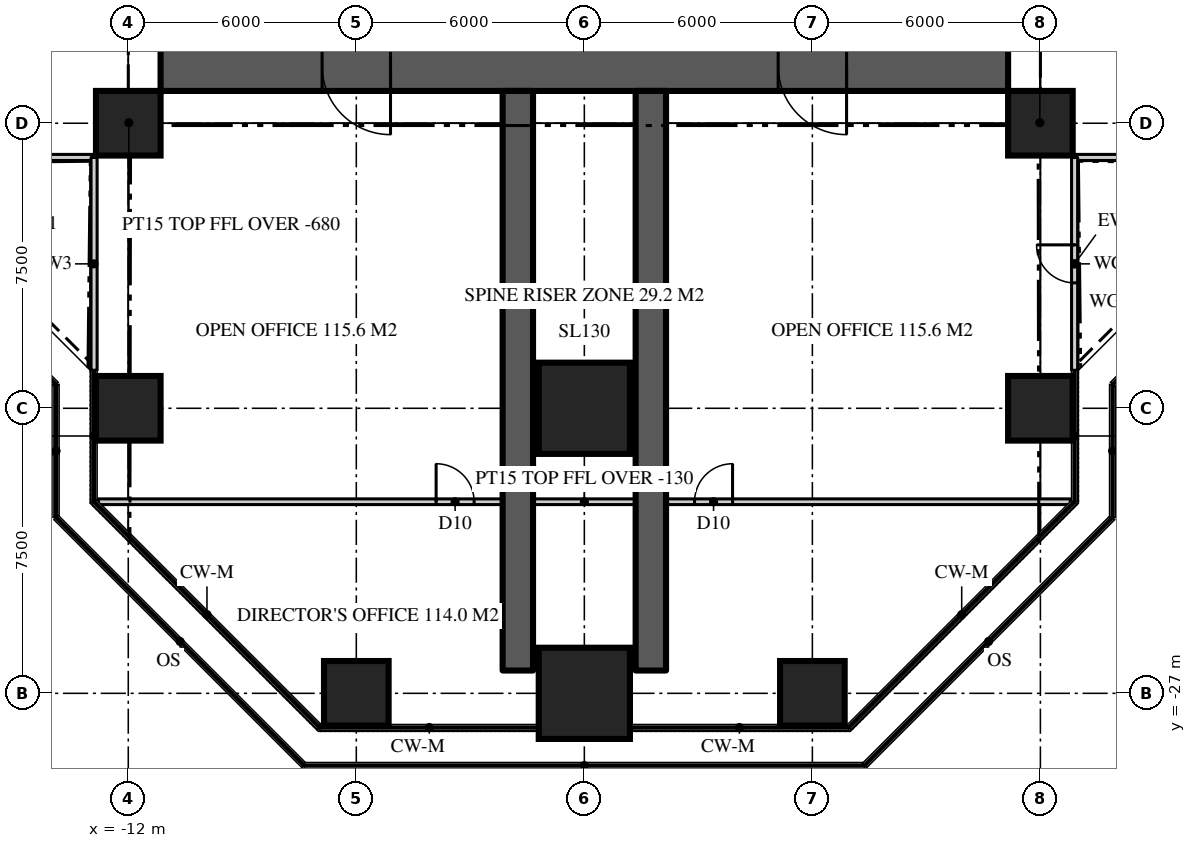
"""IFC4 building model, lengths in metres.
Left out: names, types, materials, properties, quantities, classifications, styles, units other than length and angle.
Written with IfcOpenShell. Run it as: python <this file> out.ifc"""

import sys

from ifc_helpers import new_model, si_unit, direction, frame, frame_2d, origin, origin_2d, place, context, subcontext, project, spatial, rectangle, extrude, element, fill, save


model = new_model("IFC4")
c1 = context("Model", 3, precision=1e-05, world=origin(), true_north=direction((0.0, 1.0)))
c2 = subcontext(c1, "Body", "Model", "MODEL_VIEW")
j1 = project(units=[si_unit("LENGTHUNIT", "METRE"), si_unit("PLANEANGLEUNIT", "RADIAN")], contexts=[c1])
p1 = place(None, origin())
s1 = spatial("IfcSite", under=j1, at=p1, CompositionType="ELEMENT")
p2 = place(p1, origin())
s2 = spatial("IfcBuilding", under=s1, at=p2, CompositionType="ELEMENT")
p3 = place(p2, frame((0.0, 0.0, 174.9)))
s3 = spatial("IfcBuildingStorey", under=s2, at=p3, CompositionType="ELEMENT", Elevation=174.9)
p4 = place(p3, frame((11.15, -10.5, 0.0), z_axis=(0.0, 0.0, 1.0), x_axis=(-1.0, 0.0, 0.0)))
e1 = element("IfcWall", 1, at=p4, inside=s3, PredefinedType="SHEAR", context=c2, shape_type="SweptSolid", body=[
    extrude(rectangle(XDim=22.3, YDim=1.3, at=frame_2d((11.15, 0.0))), origin(), (0.0, 0.0, 1.0), 3.9),
])
p5 = place(p4, frame((16.25, 0.0, 0.0)))
e2 = element("IfcOpeningElement", 2, at=p5, cuts=e1, PredefinedType="OPENING", context=c2, shape_type="SweptSolid", body=[
    extrude(rectangle(XDim=1.8, YDim=2.2, at=frame_2d((0.9, 1.1))), frame((0.0, 0.66, 0.0), z_axis=(0.0, -1.0, 0.0), x_axis=(1.0, 0.0, 0.0)), (0.0, 0.0, 1.0), 1.32),
])
p6 = place(p4, frame((4.25, 0.0, 0.0)))
e3 = element("IfcOpeningElement", 3, at=p6, cuts=e1, PredefinedType="OPENING", context=c2, shape_type="SweptSolid", body=[
    extrude(rectangle(XDim=1.8, YDim=2.2, at=frame_2d((0.9, 1.1))), frame((0.0, 0.66, 0.0), z_axis=(0.0, -1.0, 0.0), x_axis=(1.0, 0.0, 0.0)), (0.0, 0.0, 1.0), 1.32),
])
for number, where, z_axis, x_axis in (
    (4, (-1.75, -11.15, 0.0), (0.0, 0.0, 1.0), (0.0, -1.0, 0.0)),
    (5, (1.75, -11.15, 0.0), (0.0, 0.0, 1.0), (0.0, -1.0, 0.0)),
):
    element("IfcWall", number, at=place(p3, frame(where, z_axis=z_axis, x_axis=x_axis)), inside=s3, PredefinedType="SHEAR", context=c2, shape_type="SweptSolid", body=[
        extrude(rectangle(XDim=15.25, YDim=0.8, at=frame_2d((7.625, 0.0))), origin(), (0.0, 0.0, 1.0), 3.9),
    ])
p7 = place(p3, frame((-6.0, -27.0, 0.0), z_axis=(0.0, 0.0, 1.0), x_axis=(1.0, 0.0, 0.0)))
e6 = element("IfcColumn", 6, at=p7, inside=s3, PredefinedType="COLUMN", context=c2, shape_type="SweptSolid", body=[
    extrude(rectangle(XDim=1.7, YDim=1.7, at=origin_2d()), origin(), (0.0, 0.0, 1.0), 3.9),
])
p8 = place(p3, frame((0.0, -27.0, 0.0), z_axis=(0.0, 0.0, 1.0), x_axis=(1.0, 0.0, 0.0)))
e7 = element("IfcColumn", 7, at=p8, inside=s3, PredefinedType="COLUMN", context=c2, shape_type="SweptSolid", body=[
    extrude(rectangle(XDim=2.4, YDim=2.4, at=origin_2d()), origin(), (0.0, 0.0, 1.0), 3.9),
])
for number, where, z_axis, x_axis in (
    (8, (6.0, -27.0, 0.0), (0.0, 0.0, 1.0), (1.0, 0.0, 0.0)),
    (9, (-12.0, -19.5, 0.0), (0.0, 0.0, 1.0), (1.0, 0.0, 0.0)),
):
    element("IfcColumn", number, at=place(p3, frame(where, z_axis=z_axis, x_axis=x_axis)), inside=s3, PredefinedType="COLUMN", context=c2, shape_type="SweptSolid", body=[
        extrude(rectangle(XDim=1.7, YDim=1.7, at=origin_2d()), origin(), (0.0, 0.0, 1.0), 3.9),
    ])
p9 = place(p3, frame((0.0, -19.5, 0.0), z_axis=(0.0, 0.0, 1.0), x_axis=(1.0, 0.0, 0.0)))
e10 = element("IfcColumn", 10, at=p9, inside=s3, PredefinedType="COLUMN", context=c2, shape_type="SweptSolid", body=[
    extrude(rectangle(XDim=2.4, YDim=2.4, at=origin_2d()), origin(), (0.0, 0.0, 1.0), 3.9),
])
for number, where, z_axis, x_axis in (
    (11, (12.0, -19.5, 0.0), (0.0, 0.0, 1.0), (1.0, 0.0, 0.0)),
    (12, (-12.0, -12.0, 0.0), (0.0, 0.0, 1.0), (1.0, 0.0, 0.0)),
    (13, (12.0, -12.0, 0.0), (0.0, 0.0, 1.0), (1.0, 0.0, 0.0)),
):
    element("IfcColumn", number, at=place(p3, frame(where, z_axis=z_axis, x_axis=x_axis)), inside=s3, PredefinedType="COLUMN", context=c2, shape_type="SweptSolid", body=[
        extrude(rectangle(XDim=1.7, YDim=1.7, at=origin_2d()), origin(), (0.0, 0.0, 1.0), 3.9),
    ])
p10 = place(p3, frame((12.9, -12.9, 0.0), z_axis=(0.0, 0.0, 1.0), x_axis=(1.0, 0.0, 0.0)))
e14 = element("IfcWall", 14, at=p10, inside=s3, PredefinedType="SOLIDWALL", context=c2, shape_type="SweptSolid", body=[
    extrude(rectangle(XDim=5.6, YDim=0.16, at=frame_2d((2.8, 0.0))), origin(), (0.0, 0.0, 1.0), 3.77),
])
p11 = place(p3, frame((-18.5, -12.9, 0.0), z_axis=(0.0, 0.0, 1.0), x_axis=(1.0, 0.0, 0.0)))
e15 = element("IfcWall", 15, at=p11, inside=s3, PredefinedType="SOLIDWALL", context=c2, shape_type="SweptSolid", body=[
    extrude(rectangle(XDim=5.6, YDim=0.16, at=frame_2d((2.8, 0.0))), origin(), (0.0, 0.0, 1.0), 3.77),
])
p12 = place(p11, frame((2.3, 0.0, 0.0)))
e16 = element("IfcOpeningElement", 16, at=p12, cuts=e15, PredefinedType="OPENING", context=c2, shape_type="SweptSolid", body=[
    extrude(rectangle(XDim=1.0, YDim=2.2, at=frame_2d((0.5, 1.1))), frame((0.0, 0.09, 0.0), z_axis=(0.0, -1.0, 0.0), x_axis=(1.0, 0.0, 0.0)), (0.0, 0.0, 1.0), 0.18),
])
p13 = place(p3, frame((-12.9, -12.9, 0.0), z_axis=(0.0, 0.0, 1.0), x_axis=(0.0, -1.0, 0.0)))
e17 = element("IfcWall", 17, at=p13, inside=s3, PredefinedType="SOLIDWALL", context=c2, shape_type="SweptSolid", body=[
    extrude(rectangle(XDim=5.6, YDim=0.16, at=frame_2d((2.8, 0.0))), origin(), (0.0, 0.0, 1.0), 3.77),
])
p14 = place(p3, frame((12.9, -18.5, 0.0), z_axis=(0.0, 0.0, 1.0), x_axis=(0.0, 1.0, 0.0)))
e18 = element("IfcWall", 18, at=p14, inside=s3, PredefinedType="SOLIDWALL", context=c2, shape_type="SweptSolid", body=[
    extrude(rectangle(XDim=5.6, YDim=0.16, at=frame_2d((2.8, 0.0))), origin(), (0.0, 0.0, 1.0), 3.77),
])
p15 = place(p14, frame((2.3, 0.0, 0.0)))
e19 = element("IfcOpeningElement", 19, at=p15, cuts=e18, PredefinedType="OPENING", context=c2, shape_type="SweptSolid", body=[
    extrude(rectangle(XDim=1.0, YDim=2.2, at=frame_2d((0.5, 1.1))), frame((0.0, 0.09, 0.0), z_axis=(0.0, -1.0, 0.0), x_axis=(1.0, 0.0, 0.0)), (0.0, 0.0, 1.0), 0.18),
])
p16 = place(p3, frame((-12.786, -21.959, 0.0), z_axis=(0.0, 0.0, 1.0), x_axis=(1.0, 0.0, 0.0)))
e20 = element("IfcWall", 20, at=p16, inside=s3, PredefinedType="PARTITIONING", context=c2, shape_type="SweptSolid", body=[
    extrude(rectangle(XDim=25.573, YDim=0.15, at=frame_2d((12.786, 0.0))), origin(), (0.0, 0.0, 1.0), 3.77),
])
p17 = place(p16, frame((15.687, 0.0, 0.0)))
e21 = element("IfcOpeningElement", 21, at=p17, cuts=e20, PredefinedType="OPENING", context=c2, shape_type="SweptSolid", body=[
    extrude(rectangle(XDim=1.0, YDim=2.2, at=frame_2d((0.5, 1.1))), frame((0.0, 0.085, 0.0), z_axis=(0.0, -1.0, 0.0), x_axis=(1.0, 0.0, 0.0)), (0.0, 0.0, 1.0), 0.17),
])
p18 = place(p16, frame((8.886, 0.0, 0.0)))
e22 = element("IfcOpeningElement", 22, at=p18, cuts=e20, PredefinedType="OPENING", context=c2, shape_type="SweptSolid", body=[
    extrude(rectangle(XDim=1.0, YDim=2.2, at=frame_2d((0.5, 1.1))), frame((0.0, 0.085, 0.0), z_axis=(0.0, -1.0, 0.0), x_axis=(1.0, 0.0, 0.0)), (0.0, 0.0, 1.0), 0.17),
])
for number, where, z_axis, x_axis in (
    (23, (-11.15, -11.15, 0.0), (0.0, 0.0, 1.0), (-0.707, -0.707, 0.0)),
    (24, (11.15, -11.15, 0.0), (0.0, 0.0, 1.0), (0.707, -0.707, 0.0)),
):
    element("IfcWall", number, at=place(p3, frame(where, z_axis=z_axis, x_axis=x_axis)), inside=s3, PredefinedType="PARTITIONING", context=c2, shape_type="SweptSolid", body=[
        extrude(rectangle(XDim=2.362, YDim=0.15, at=frame_2d((1.181, 0.0))), origin(), (0.0, 0.0, 1.0), 3.22),
    ])
p19 = place(p15, origin())
e25 = element("IfcDoor", 25, at=p19, inside=s3, OperationType="SINGLE_SWING_RIGHT", PredefinedType="DOOR", context=c2, shape_type="SweptSolid", body=[
    extrude(rectangle(XDim=1.0, YDim=2.2, at=frame_2d((0.5, 1.1))), frame((0.0, 0.025, 0.0), z_axis=(0.0, -1.0, 0.0), x_axis=(1.0, 0.0, 0.0)), (0.0, 0.0, 1.0), 0.05),
])
fill(e19, e25)
p20 = place(p5, origin())
e26 = element("IfcDoor", 26, at=p20, inside=s3, OperationType="DOUBLE_DOOR_DOUBLE_SWING", PredefinedType="DOOR", context=c2, shape_type="SweptSolid", body=[
    extrude(rectangle(XDim=1.8, YDim=2.2, at=frame_2d((0.9, 1.1))), frame((0.0, 0.025, 0.0), z_axis=(0.0, -1.0, 0.0), x_axis=(1.0, 0.0, 0.0)), (0.0, 0.0, 1.0), 0.05),
])
fill(e2, e26)
p21 = place(p6, origin())
e27 = element("IfcDoor", 27, at=p21, inside=s3, OperationType="DOUBLE_DOOR_DOUBLE_SWING", PredefinedType="DOOR", context=c2, shape_type="SweptSolid", body=[
    extrude(rectangle(XDim=1.8, YDim=2.2, at=frame_2d((0.9, 1.1))), frame((0.0, 0.025, 0.0), z_axis=(0.0, -1.0, 0.0), x_axis=(1.0, 0.0, 0.0)), (0.0, 0.0, 1.0), 0.05),
])
fill(e3, e27)
p22 = place(p17, origin())
e28 = element("IfcDoor", 28, at=p22, inside=s3, OperationType="SINGLE_SWING_RIGHT", PredefinedType="DOOR", context=c2, shape_type="SweptSolid", body=[
    extrude(rectangle(XDim=1.0, YDim=2.2, at=frame_2d((0.5, 1.1))), frame((0.0, 0.025, 0.0), z_axis=(0.0, -1.0, 0.0), x_axis=(1.0, 0.0, 0.0)), (0.0, 0.0, 1.0), 0.05),
])
fill(e21, e28)
p23 = place(p18, origin())
e29 = element("IfcDoor", 29, at=p23, inside=s3, OperationType="SINGLE_SWING_LEFT", PredefinedType="DOOR", context=c2, shape_type="SweptSolid", body=[
    extrude(rectangle(XDim=1.0, YDim=2.2, at=frame_2d((0.5, 1.1))), frame((0.0, 0.025, 0.0), z_axis=(0.0, -1.0, 0.0), x_axis=(1.0, 0.0, 0.0)), (0.0, 0.0, 1.0), 0.05),
])
fill(e22, e29)
save(model, sys.argv[1])
